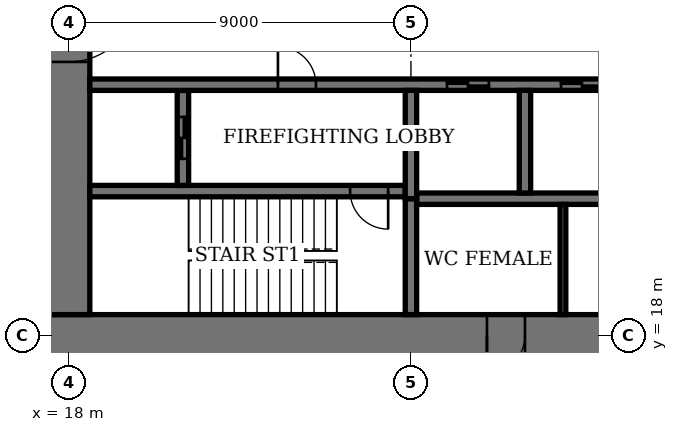
"""IFC4 building model, lengths in metres.
Left out: names, types, materials, properties, quantities, classifications, styles, units other than length and angle.
Written with IfcOpenShell. Run it as: python <this file> out.ifc"""

import sys

from ifc_helpers import new_model, si_unit, direction, frame, frame_2d, origin, place, context, subcontext, project, spatial, rectangle, extrude, element, fill, save


model = new_model("IFC4")
c1 = context("Model", 3, precision=1e-05, world=origin(), true_north=direction((0.0, 1.0)))
c2 = subcontext(c1, "Body", "Model", "MODEL_VIEW")
j1 = project(units=[si_unit("LENGTHUNIT", "METRE"), si_unit("PLANEANGLEUNIT", "RADIAN")], contexts=[c1])
p1 = place(None, origin())
s1 = spatial("IfcSite", under=j1, at=p1, CompositionType="ELEMENT")
p2 = place(p1, origin())
s2 = spatial("IfcBuilding", under=s1, at=p2, CompositionType="ELEMENT")
p3 = place(p2, frame((0.0, 0.0, 283.4)))
s3 = spatial("IfcBuildingStorey", under=s2, at=p3, CompositionType="ELEMENT", Elevation=283.4)
p4 = place(p3, frame((17.45, 18.0, 0.0), z_axis=(0.0, 0.0, 1.0), x_axis=(1.0, 0.0, 0.0)))
e1 = element("IfcWall", 1, at=p4, inside=s3, PredefinedType="SHEAR", context=c2, shape_type="SweptSolid", body=[
    extrude(rectangle(XDim=28.1, YDim=1.1, at=frame_2d((14.05, 0.0))), origin(), (0.0, 0.0, 1.0), 4.0),
])
p5 = place(p4, frame((11.55, 0.0, 0.0)))
e2 = element("IfcOpeningElement", 2, at=p5, cuts=e1, PredefinedType="OPENING", context=c2, shape_type="SweptSolid", body=[
    extrude(rectangle(XDim=1.0, YDim=2.4, at=frame_2d((0.5, 1.2))), frame((0.0, 0.56, 0.0), z_axis=(0.0, -1.0, 0.0), x_axis=(1.0, 0.0, 0.0)), (0.0, 0.0, 1.0), 1.12),
])
p6 = place(p4, frame((16.55, 0.0, 0.0)))
e3 = element("IfcOpeningElement", 3, at=p6, cuts=e1, PredefinedType="OPENING", context=c2, shape_type="SweptSolid", body=[
    extrude(rectangle(XDim=1.0, YDim=2.4, at=frame_2d((0.5, 1.2))), frame((0.0, 0.56, 0.0), z_axis=(0.0, -1.0, 0.0), x_axis=(1.0, 0.0, 0.0)), (0.0, 0.0, 1.0), 1.12),
])
p7 = place(p4, frame((20.0, 0.0, 0.0)))
e4 = element("IfcOpeningElement", 4, at=p7, cuts=e1, PredefinedType="OPENING", context=c2, shape_type="SweptSolid", body=[
    extrude(rectangle(XDim=1.1, YDim=2.4, at=frame_2d((0.55, 1.2))), frame((0.0, 0.56, 0.0), z_axis=(0.0, -1.0, 0.0), x_axis=(1.0, 0.0, 0.0)), (0.0, 0.0, 1.0), 1.12),
])
p8 = place(p4, frame((24.05, 0.0, 0.0)))
e5 = element("IfcOpeningElement", 5, at=p8, cuts=e1, PredefinedType="OPENING", context=c2, shape_type="SweptSolid", body=[
    extrude(rectangle(XDim=1.0, YDim=2.4, at=frame_2d((0.5, 1.2))), frame((0.0, 0.56, 0.0), z_axis=(0.0, -1.0, 0.0), x_axis=(1.0, 0.0, 0.0)), (0.0, 0.0, 1.0), 1.12),
])
p9 = place(p3, frame((18.0, 35.45, 0.0), z_axis=(0.0, 0.0, 1.0), x_axis=(0.0, -1.0, 0.0)))
e6 = element("IfcWall", 6, at=p9, inside=s3, PredefinedType="SHEAR", context=c2, shape_type="SweptSolid", body=[
    extrude(rectangle(XDim=16.9, YDim=1.1, at=frame_2d((8.45, 0.0))), origin(), (0.0, 0.0, 1.0), 4.0),
])
p10 = place(p9, frame((8.45, 0.0, 0.0)))
e7 = element("IfcOpeningElement", 7, at=p10, cuts=e6, PredefinedType="OPENING", context=c2, shape_type="SweptSolid", body=[
    extrude(rectangle(XDim=1.8, YDim=2.4, at=frame_2d((0.9, 1.2))), frame((0.0, 0.56, 0.0), z_axis=(0.0, -1.0, 0.0), x_axis=(1.0, 0.0, 0.0)), (0.0, 0.0, 1.0), 1.12),
])
p11 = place(p3, frame((18.55, 21.8, 0.0), z_axis=(0.0, 0.0, 1.0), x_axis=(1.0, 0.0, 0.0)))
e8 = element("IfcWall", 8, at=p11, inside=s3, PredefinedType="SHEAR", context=c2, shape_type="SweptSolid", body=[
    extrude(rectangle(XDim=8.3, YDim=0.3, at=frame_2d((4.15, 0.0))), origin(), (0.0, 0.0, 1.0), 4.0),
])
p12 = place(p11, frame((6.85, 0.0, 0.0)))
e9 = element("IfcOpeningElement", 9, at=p12, cuts=e8, PredefinedType="OPENING", context=c2, shape_type="SweptSolid", body=[
    extrude(rectangle(XDim=1.0, YDim=2.4, at=frame_2d((0.5, 1.2))), frame((0.0, 0.16, 0.0), z_axis=(0.0, -1.0, 0.0), x_axis=(1.0, 0.0, 0.0)), (0.0, 0.0, 1.0), 0.32),
])
p13 = place(p3, frame((27.0, 18.55, 0.0), z_axis=(0.0, 0.0, 1.0), x_axis=(0.0, 1.0, 0.0)))
e10 = element("IfcWall", 10, at=p13, inside=s3, PredefinedType="SHEAR", context=c2, shape_type="SweptSolid", body=[
    extrude(rectangle(XDim=3.05, YDim=0.3, at=frame_2d((1.525, 0.0))), origin(), (0.0, 0.0, 1.0), 4.0),
])
p14 = place(p3, frame((21.0, 21.95, 0.0), z_axis=(0.0, 0.0, 1.0), x_axis=(0.0, 1.0, 0.0)))
e11 = element("IfcWall", 11, at=p14, inside=s3, PredefinedType="SHEAR", context=c2, shape_type="SweptSolid", body=[
    extrude(rectangle(XDim=2.5, YDim=0.3, at=frame_2d((1.25, 0.0))), origin(), (0.0, 0.0, 1.0), 4.0),
])
p15 = place(p14, frame((0.7, 0.0, 0.0)))
e12 = element("IfcOpeningElement", 12, at=p15, cuts=e11, PredefinedType="OPENING", context=c2, shape_type="SweptSolid", body=[
    extrude(rectangle(XDim=1.1, YDim=2.4, at=frame_2d((0.55, 1.2))), frame((0.0, 0.16, 0.0), z_axis=(0.0, -1.0, 0.0), x_axis=(1.0, 0.0, 0.0)), (0.0, 0.0, 1.0), 0.32),
])
p16 = place(p3, frame((18.55, 24.6, 0.0), z_axis=(0.0, 0.0, 1.0), x_axis=(1.0, 0.0, 0.0)))
e13 = element("IfcWall", 13, at=p16, inside=s3, PredefinedType="SHEAR", context=c2, shape_type="SweptSolid", body=[
    extrude(rectangle(XDim=25.9, YDim=0.3, at=frame_2d((12.95, 0.0))), origin(), (0.0, 0.0, 1.0), 4.0),
])
p17 = place(p16, frame((4.95, 0.0, 0.0)))
e14 = element("IfcOpeningElement", 14, at=p17, cuts=e13, PredefinedType="OPENING", context=c2, shape_type="SweptSolid", body=[
    extrude(rectangle(XDim=1.0, YDim=2.4, at=frame_2d((0.5, 1.2))), frame((0.0, 0.16, 0.0), z_axis=(0.0, -1.0, 0.0), x_axis=(1.0, 0.0, 0.0)), (0.0, 0.0, 1.0), 0.32),
])
p18 = place(p16, frame((24.5, 0.0, 0.0)))
e15 = element("IfcOpeningElement", 15, at=p18, cuts=e13, PredefinedType="OPENING", context=c2, shape_type="SweptSolid", body=[
    extrude(rectangle(XDim=0.9, YDim=2.1, at=frame_2d((0.45, 1.05))), frame((0.0, 0.16, 0.0), z_axis=(0.0, -1.0, 0.0), x_axis=(1.0, 0.0, 0.0)), (0.0, 0.0, 1.0), 0.32),
])
p19 = place(p16, frame((9.4, 0.0, 0.0)))
e16 = element("IfcOpeningElement", 16, at=p19, cuts=e13, PredefinedType="OPENING", context=c2, shape_type="SweptSolid", body=[
    extrude(rectangle(XDim=1.1, YDim=2.4, at=frame_2d((0.55, 1.2))), frame((0.0, 0.16, 0.0), z_axis=(0.0, -1.0, 0.0), x_axis=(1.0, 0.0, 0.0)), (0.0, 0.0, 1.0), 0.32),
])
p20 = place(p16, frame((12.4, 0.0, 0.0)))
e17 = element("IfcOpeningElement", 17, at=p20, cuts=e13, PredefinedType="OPENING", context=c2, shape_type="SweptSolid", body=[
    extrude(rectangle(XDim=1.1, YDim=2.4, at=frame_2d((0.55, 1.2))), frame((0.0, 0.16, 0.0), z_axis=(0.0, -1.0, 0.0), x_axis=(1.0, 0.0, 0.0)), (0.0, 0.0, 1.0), 0.32),
])
p21 = place(p16, frame((15.4, 0.0, 0.0)))
e18 = element("IfcOpeningElement", 18, at=p21, cuts=e13, PredefinedType="OPENING", context=c2, shape_type="SweptSolid", body=[
    extrude(rectangle(XDim=1.1, YDim=2.4, at=frame_2d((0.55, 1.2))), frame((0.0, 0.16, 0.0), z_axis=(0.0, -1.0, 0.0), x_axis=(1.0, 0.0, 0.0)), (0.0, 0.0, 1.0), 0.32),
])
p22 = place(p16, frame((18.4, 0.0, 0.0)))
e19 = element("IfcOpeningElement", 19, at=p22, cuts=e13, PredefinedType="OPENING", context=c2, shape_type="SweptSolid", body=[
    extrude(rectangle(XDim=1.1, YDim=2.4, at=frame_2d((0.55, 1.2))), frame((0.0, 0.16, 0.0), z_axis=(0.0, -1.0, 0.0), x_axis=(1.0, 0.0, 0.0)), (0.0, 0.0, 1.0), 0.32),
])
p23 = place(p16, frame((21.3, 0.0, 0.0)))
e20 = element("IfcOpeningElement", 20, at=p23, cuts=e13, PredefinedType="OPENING", context=c2, shape_type="SweptSolid", body=[
    extrude(rectangle(XDim=1.3, YDim=2.4, at=frame_2d((0.65, 1.2))), frame((0.0, 0.16, 0.0), z_axis=(0.0, -1.0, 0.0), x_axis=(1.0, 0.0, 0.0)), (0.0, 0.0, 1.0), 0.32),
])
p24 = place(p3, frame((27.15, 21.6, 0.0), z_axis=(0.0, 0.0, 1.0), x_axis=(1.0, 0.0, 0.0)))
e21 = element("IfcWall", 21, at=p24, inside=s3, PredefinedType="SHEAR", context=c2, shape_type="SweptSolid", body=[
    extrude(rectangle(XDim=17.3, YDim=0.3, at=frame_2d((8.65, 0.0))), origin(), (0.0, 0.0, 1.0), 4.0),
])
p25 = place(p3, frame((30.0, 21.75, 0.0), z_axis=(0.0, 0.0, 1.0), x_axis=(0.0, 1.0, 0.0)))
e22 = element("IfcWall", 22, at=p25, inside=s3, PredefinedType="SHEAR", context=c2, shape_type="SweptSolid", body=[
    extrude(rectangle(XDim=2.7, YDim=0.3, at=frame_2d((1.35, 0.0))), origin(), (0.0, 0.0, 1.0), 4.0),
])
p26 = place(p3, frame((27.0, 21.6, 0.0), z_axis=(0.0, 0.0, 1.0), x_axis=(0.0, 1.0, 0.0)))
e23 = element("IfcWall", 23, at=p26, inside=s3, PredefinedType="SHEAR", context=c2, shape_type="SweptSolid", body=[
    extrude(rectangle(XDim=2.85, YDim=0.3, at=frame_2d((1.425, 0.0))), origin(), (0.0, 0.0, 1.0), 4.0),
])
p27 = place(p3, frame((31.0, 18.55, 0.0), z_axis=(0.0, 0.0, 1.0), x_axis=(0.0, 1.0, 0.0)))
e24 = element("IfcWall", 24, at=p27, inside=s3, PredefinedType="PARTITIONING", context=c2, shape_type="SweptSolid", body=[
    extrude(rectangle(XDim=2.9, YDim=0.15, at=frame_2d((1.45, 0.0))), origin(), (0.0, 0.0, 1.0), 3.75),
])
p28 = place(p10, origin())
e25 = element("IfcDoor", 25, at=p28, inside=s3, OperationType="DOUBLE_DOOR_DOUBLE_SWING", PredefinedType="DOOR", context=c2, shape_type="SweptSolid", body=[
    extrude(rectangle(XDim=1.8, YDim=2.4, at=frame_2d((0.9, 1.2))), frame((0.0, 0.03, 0.0), z_axis=(0.0, -1.0, 0.0), x_axis=(1.0, 0.0, 0.0)), (0.0, 0.0, 1.0), 0.06),
    extrude(rectangle(XDim=0.04, YDim=2.4, at=frame_2d((0.02, 1.2))), frame((0.0, 0.55, 0.0), z_axis=(0.0, -1.0, 0.0), x_axis=(1.0, 0.0, 0.0)), (0.0, 0.0, 1.0), 1.1),
    extrude(rectangle(XDim=0.04, YDim=2.4, at=frame_2d((1.78, 1.2))), frame((0.0, 0.55, 0.0), z_axis=(0.0, -1.0, 0.0), x_axis=(1.0, 0.0, 0.0)), (0.0, 0.0, 1.0), 1.1),
    extrude(rectangle(XDim=1.8, YDim=0.04, at=frame_2d((0.9, 2.38))), frame((0.0, 0.55, 0.0), z_axis=(0.0, -1.0, 0.0), x_axis=(1.0, 0.0, 0.0)), (0.0, 0.0, 1.0), 1.1),
])
fill(e7, e25)
p29 = place(p5, origin())
e26 = element("IfcDoor", 26, at=p29, inside=s3, OperationType="SINGLE_SWING_LEFT", PredefinedType="DOOR", context=c2, shape_type="SweptSolid", body=[
    extrude(rectangle(XDim=1.0, YDim=2.4, at=frame_2d((0.5, 1.2))), frame((0.0, 0.025, 0.0), z_axis=(0.0, -1.0, 0.0), x_axis=(1.0, 0.0, 0.0)), (0.0, 0.0, 1.0), 0.05),
    extrude(rectangle(XDim=0.04, YDim=2.4, at=frame_2d((0.02, 1.2))), frame((0.0, 0.4, 0.0), z_axis=(0.0, -1.0, 0.0), x_axis=(1.0, 0.0, 0.0)), (0.0, 0.0, 1.0), 0.8),
    extrude(rectangle(XDim=0.04, YDim=2.4, at=frame_2d((0.98, 1.2))), frame((0.0, 0.4, 0.0), z_axis=(0.0, -1.0, 0.0), x_axis=(1.0, 0.0, 0.0)), (0.0, 0.0, 1.0), 0.8),
    extrude(rectangle(XDim=1.0, YDim=0.04, at=frame_2d((0.5, 2.38))), frame((0.0, 0.4, 0.0), z_axis=(0.0, -1.0, 0.0), x_axis=(1.0, 0.0, 0.0)), (0.0, 0.0, 1.0), 0.8),
])
fill(e2, e26)
p30 = place(p12, origin())
e27 = element("IfcDoor", 27, at=p30, inside=s3, OperationType="SINGLE_SWING_RIGHT", PredefinedType="DOOR", context=c2, shape_type="SweptSolid", body=[
    extrude(rectangle(XDim=1.0, YDim=2.4, at=frame_2d((0.5, 1.2))), frame((0.0, 0.03, 0.0), z_axis=(0.0, -1.0, 0.0), x_axis=(1.0, 0.0, 0.0)), (0.0, 0.0, 1.0), 0.06),
])
fill(e9, e27)
p31 = place(p17, origin())
e28 = element("IfcDoor", 28, at=p31, inside=s3, OperationType="SINGLE_SWING_RIGHT", PredefinedType="DOOR", context=c2, shape_type="SweptSolid", body=[
    extrude(rectangle(XDim=1.0, YDim=2.4, at=frame_2d((0.5, 1.2))), frame((0.0, 0.03, 0.0), z_axis=(0.0, -1.0, 0.0), x_axis=(1.0, 0.0, 0.0)), (0.0, 0.0, 1.0), 0.06),
])
fill(e14, e28)
p32 = place(p19, origin())
e29 = element("IfcDoor", 29, at=p32, inside=s3, OperationType="DOUBLE_DOOR_SLIDING", PredefinedType="DOOR", context=c2, shape_type="SweptSolid", body=[
    extrude(rectangle(XDim=1.1, YDim=2.4, at=frame_2d((0.55, 1.2))), frame((0.0, 0.02, 0.0), z_axis=(0.0, -1.0, 0.0), x_axis=(1.0, 0.0, 0.0)), (0.0, 0.0, 1.0), 0.04),
])
fill(e16, e29)
p33 = place(p20, origin())
e30 = element("IfcDoor", 30, at=p33, inside=s3, OperationType="DOUBLE_DOOR_SLIDING", PredefinedType="DOOR", context=c2, shape_type="SweptSolid", body=[
    extrude(rectangle(XDim=1.1, YDim=2.4, at=frame_2d((0.55, 1.2))), frame((0.0, 0.02, 0.0), z_axis=(0.0, -1.0, 0.0), x_axis=(1.0, 0.0, 0.0)), (0.0, 0.0, 1.0), 0.04),
])
fill(e17, e30)
p34 = place(p15, origin())
e31 = element("IfcDoor", 31, at=p34, inside=s3, OperationType="DOUBLE_DOOR_SLIDING", PredefinedType="DOOR", context=c2, shape_type="SweptSolid", body=[
    extrude(rectangle(XDim=1.1, YDim=2.4, at=frame_2d((0.55, 1.2))), frame((0.0, 0.03, 0.0), z_axis=(0.0, -1.0, 0.0), x_axis=(1.0, 0.0, 0.0)), (0.0, 0.0, 1.0), 0.06),
])
fill(e12, e31)
save(model, sys.argv[1])
